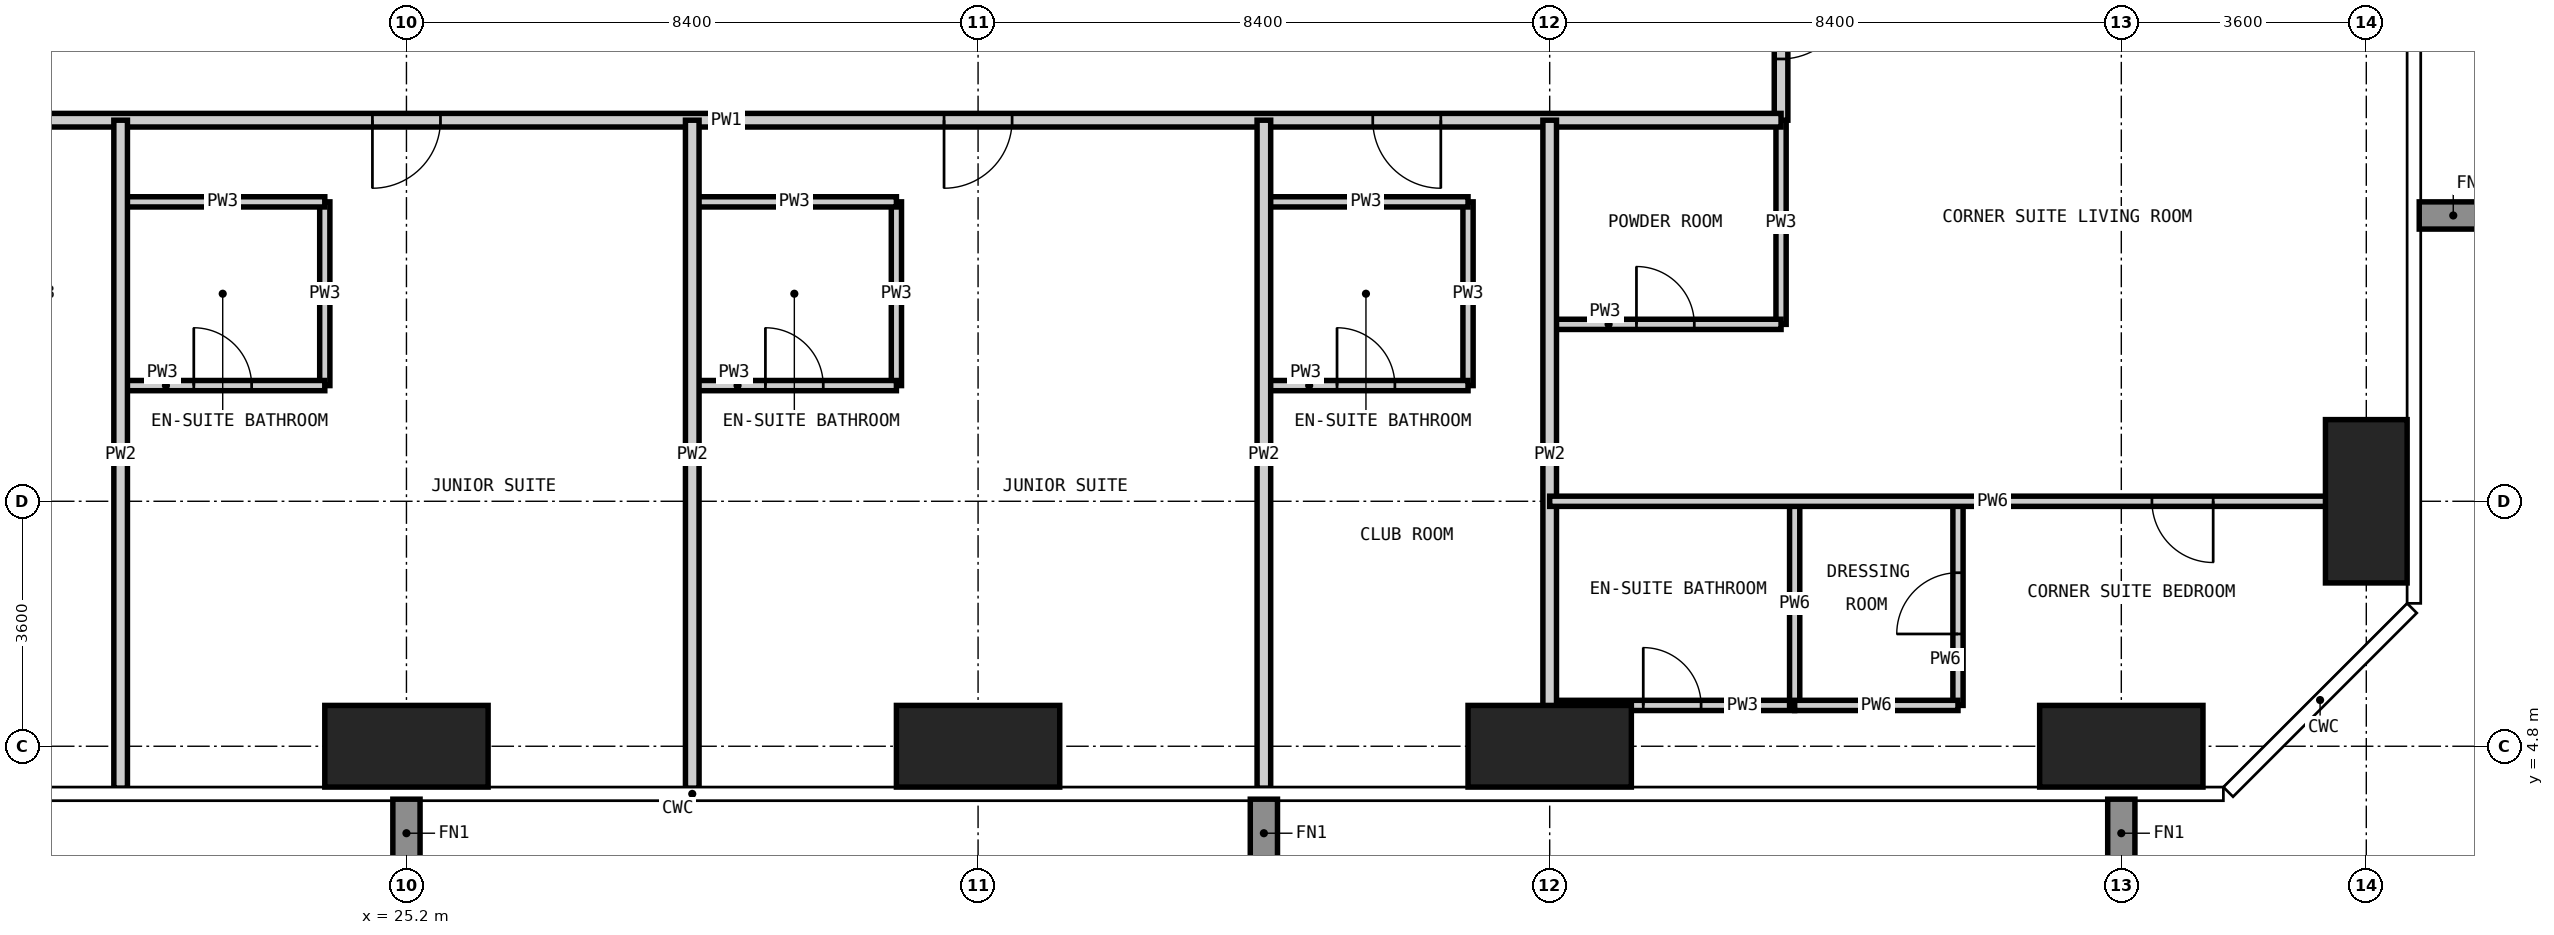
"""IFC4 building model, lengths in metres.
Left out: names, types, materials, properties, quantities, classifications, styles, units other than length and angle.
Written with IfcOpenShell. Run it as: python <this file> out.ifc"""

import sys

from ifc_helpers import new_model, si_unit, direction, frame, frame_2d, origin, origin_2d, place, context, subcontext, project, spatial, rectangle, extrude, element, fill, save


model = new_model("IFC4")
c1 = context("Model", 3, precision=1e-05, world=origin(), true_north=direction((0.0, 1.0)))
c2 = subcontext(c1, "Body", "Model", "MODEL_VIEW")
j1 = project(units=[si_unit("LENGTHUNIT", "METRE"), si_unit("PLANEANGLEUNIT", "RADIAN")], contexts=[c1])
p1 = place(None, origin())
s1 = spatial("IfcSite", under=j1, at=p1, CompositionType="ELEMENT")
p2 = place(p1, origin())
s2 = spatial("IfcBuilding", under=s1, at=p2, CompositionType="ELEMENT")
p3 = place(p2, frame((0.0, 0.0, 187.8)))
s3 = spatial("IfcBuildingStorey", under=s2, at=p3, CompositionType="ELEMENT", Elevation=187.8)
for number, where, z_axis, x_axis in (
    (1, (25.2, 4.8, -0.35), (0.0, 0.0, 1.0), (1.0, 0.0, 0.0)),
    (2, (33.6, 4.8, -0.35), (0.0, 0.0, 1.0), (1.0, 0.0, 0.0)),
    (3, (42.0, 4.8, -0.35), (0.0, 0.0, 1.0), (1.0, 0.0, 0.0)),
    (4, (50.4, 4.8, -0.35), (0.0, 0.0, 1.0), (1.0, 0.0, 0.0)),
):
    element("IfcColumn", number, at=place(p3, frame(where, z_axis=z_axis, x_axis=x_axis)), inside=s3, PredefinedType="COLUMN", context=c2, shape_type="SweptSolid", body=[
        extrude(rectangle(XDim=2.4, YDim=1.2, at=origin_2d()), origin(), (0.0, 0.0, 1.0), 3.6),
    ])
p4 = place(p3, frame((54.0, 8.4, -0.35), z_axis=(0.0, 0.0, 1.0), x_axis=(1.0, 0.0, 0.0)))
e5 = element("IfcColumn", 5, at=p4, inside=s3, PredefinedType="COLUMN", context=c2, shape_type="SweptSolid", body=[
    extrude(rectangle(XDim=1.2, YDim=2.4, at=origin_2d()), origin(), (0.0, 0.0, 1.0), 3.6),
])
for number, where, z_axis, x_axis in (
    (6, (24.0, 10.1, 0.0), (0.0, 0.0, 1.0), (0.0, 1.0, 0.0)),
    (7, (32.4, 10.1, 0.0), (0.0, 0.0, 1.0), (0.0, 1.0, 0.0)),
    (8, (40.8, 10.1, 0.0), (0.0, 0.0, 1.0), (0.0, 1.0, 0.0)),
):
    element("IfcWall", number, at=place(p3, frame(where, z_axis=z_axis, x_axis=x_axis)), inside=s3, PredefinedType="PARTITIONING", context=c2, shape_type="SweptSolid", body=[
        extrude(rectangle(XDim=2.7, YDim=0.15, at=frame_2d((1.35, 0.0))), origin(), (0.0, 0.0, 1.0), 3.25),
    ])
p5 = place(p3, frame((45.4, 11.0, 0.0), z_axis=(0.0, 0.0, 1.0), x_axis=(0.0, 1.0, 0.0)))
e9 = element("IfcWall", 9, at=p5, inside=s3, PredefinedType="PARTITIONING", context=c2, shape_type="SweptSolid", body=[
    extrude(rectangle(XDim=3.0, YDim=0.15, at=frame_2d((1.5, 0.0))), origin(), (0.0, 0.0, 1.0), 3.25),
])
p6 = place(p3, frame((42.0, 5.4, 0.0), z_axis=(0.0, 0.0, 1.0), x_axis=(1.0, 0.0, 0.0)))
e10 = element("IfcWall", 10, at=p6, inside=s3, PredefinedType="PARTITIONING", context=c2, shape_type="SweptSolid", body=[
    extrude(rectangle(XDim=3.6, YDim=0.15, at=frame_2d((1.8, 0.0))), origin(), (0.0, 0.0, 1.0), 3.25),
])
p7 = place(p6, frame((1.375, 0.0, 0.0)))
e11 = element("IfcOpeningElement", 11, at=p7, cuts=e10, PredefinedType="OPENING", context=c2, shape_type="SweptSolid", body=[
    extrude(rectangle(XDim=0.85, YDim=2.1, at=frame_2d((0.425, 1.05))), frame((0.0, 0.085, 0.0), z_axis=(0.0, -1.0, 0.0), x_axis=(1.0, 0.0, 0.0)), (0.0, 0.0, 1.0), 0.17),
])
p8 = place(p3, frame((21.0, 10.1, 0.0), z_axis=(0.0, 0.0, 1.0), x_axis=(1.0, 0.0, 0.0)))
e12 = element("IfcWall", 12, at=p8, inside=s3, PredefinedType="PARTITIONING", context=c2, shape_type="SweptSolid", body=[
    extrude(rectangle(XDim=3.0, YDim=0.15, at=frame_2d((1.5, 0.0))), origin(), (0.0, 0.0, 1.0), 3.25),
])
p9 = place(p8, frame((1.075, 0.0, 0.0)))
e13 = element("IfcOpeningElement", 13, at=p9, cuts=e12, PredefinedType="OPENING", context=c2, shape_type="SweptSolid", body=[
    extrude(rectangle(XDim=0.85, YDim=2.1, at=frame_2d((0.425, 1.05))), frame((0.0, 0.085, 0.0), z_axis=(0.0, -1.0, 0.0), x_axis=(1.0, 0.0, 0.0)), (0.0, 0.0, 1.0), 0.17),
])
p10 = place(p3, frame((29.4, 10.1, 0.0), z_axis=(0.0, 0.0, 1.0), x_axis=(1.0, 0.0, 0.0)))
e14 = element("IfcWall", 14, at=p10, inside=s3, PredefinedType="PARTITIONING", context=c2, shape_type="SweptSolid", body=[
    extrude(rectangle(XDim=3.0, YDim=0.15, at=frame_2d((1.5, 0.0))), origin(), (0.0, 0.0, 1.0), 3.25),
])
p11 = place(p10, frame((1.075, 0.0, 0.0)))
e15 = element("IfcOpeningElement", 15, at=p11, cuts=e14, PredefinedType="OPENING", context=c2, shape_type="SweptSolid", body=[
    extrude(rectangle(XDim=0.85, YDim=2.1, at=frame_2d((0.425, 1.05))), frame((0.0, 0.085, 0.0), z_axis=(0.0, -1.0, 0.0), x_axis=(1.0, 0.0, 0.0)), (0.0, 0.0, 1.0), 0.17),
])
p12 = place(p3, frame((37.8, 10.1, 0.0), z_axis=(0.0, 0.0, 1.0), x_axis=(1.0, 0.0, 0.0)))
e16 = element("IfcWall", 16, at=p12, inside=s3, PredefinedType="PARTITIONING", context=c2, shape_type="SweptSolid", body=[
    extrude(rectangle(XDim=3.0, YDim=0.15, at=frame_2d((1.5, 0.0))), origin(), (0.0, 0.0, 1.0), 3.25),
])
p13 = place(p12, frame((1.075, 0.0, 0.0)))
e17 = element("IfcOpeningElement", 17, at=p13, cuts=e16, PredefinedType="OPENING", context=c2, shape_type="SweptSolid", body=[
    extrude(rectangle(XDim=0.85, YDim=2.1, at=frame_2d((0.425, 1.05))), frame((0.0, 0.085, 0.0), z_axis=(0.0, -1.0, 0.0), x_axis=(1.0, 0.0, 0.0)), (0.0, 0.0, 1.0), 0.17),
])
p14 = place(p3, frame((42.0, 11.0, 0.0), z_axis=(0.0, 0.0, 1.0), x_axis=(1.0, 0.0, 0.0)))
e18 = element("IfcWall", 18, at=p14, inside=s3, PredefinedType="PARTITIONING", context=c2, shape_type="SweptSolid", body=[
    extrude(rectangle(XDim=3.4, YDim=0.15, at=frame_2d((1.7, 0.0))), origin(), (0.0, 0.0, 1.0), 3.25),
])
p15 = place(p14, frame((1.275, 0.0, 0.0)))
e19 = element("IfcOpeningElement", 19, at=p15, cuts=e18, PredefinedType="OPENING", context=c2, shape_type="SweptSolid", body=[
    extrude(rectangle(XDim=0.85, YDim=2.1, at=frame_2d((0.425, 1.05))), frame((0.0, 0.085, 0.0), z_axis=(0.0, -1.0, 0.0), x_axis=(1.0, 0.0, 0.0)), (0.0, 0.0, 1.0), 0.17),
])
for number, where, z_axis, x_axis in (
    (20, (21.0, 12.8, 0.0), (0.0, 0.0, 1.0), (1.0, 0.0, 0.0)),
    (21, (29.4, 12.8, 0.0), (0.0, 0.0, 1.0), (1.0, 0.0, 0.0)),
    (22, (37.8, 12.8, 0.0), (0.0, 0.0, 1.0), (1.0, 0.0, 0.0)),
):
    element("IfcWall", number, at=place(p3, frame(where, z_axis=z_axis, x_axis=x_axis)), inside=s3, PredefinedType="PARTITIONING", context=c2, shape_type="SweptSolid", body=[
        extrude(rectangle(XDim=3.0, YDim=0.15, at=frame_2d((1.5, 0.0))), origin(), (0.0, 0.0, 1.0), 3.25),
    ])
p16 = place(p3, frame((45.4, 44.2, 0.0), z_axis=(0.0, 0.0, 1.0), x_axis=(0.0, -1.0, 0.0)))
e23 = element("IfcWall", 23, at=p16, inside=s3, PredefinedType="PARTITIONING", context=c2, shape_type="SweptSolid", body=[
    extrude(rectangle(XDim=30.2, YDim=0.2, at=frame_2d((15.1, 0.0))), origin(), (0.0, 0.0, 1.0), 3.25),
])
p17 = place(p16, frame((21.8, 0.0, 0.0)))
e24 = element("IfcOpeningElement", 24, at=p17, cuts=e23, PredefinedType="OPENING", context=c2, shape_type="SweptSolid", body=[
    extrude(rectangle(XDim=1.0, YDim=2.2, at=frame_2d((0.5, 1.1))), frame((0.0, 0.11, 0.0), z_axis=(0.0, -1.0, 0.0), x_axis=(1.0, 0.0, 0.0)), (0.0, 0.0, 1.0), 0.22),
])
p18 = place(p16, frame((11.0, 0.0, 0.0)))
e25 = element("IfcOpeningElement", 25, at=p18, cuts=e23, PredefinedType="OPENING", context=c2, shape_type="SweptSolid", body=[
    extrude(rectangle(XDim=1.0, YDim=2.2, at=frame_2d((0.5, 1.1))), frame((0.0, 0.11, 0.0), z_axis=(0.0, -1.0, 0.0), x_axis=(1.0, 0.0, 0.0)), (0.0, 0.0, 1.0), 0.22),
])
p19 = place(p16, frame((3.8, 0.0, 0.0)))
e26 = element("IfcOpeningElement", 26, at=p19, cuts=e23, PredefinedType="OPENING", context=c2, shape_type="SweptSolid", body=[
    extrude(rectangle(XDim=1.0, YDim=2.2, at=frame_2d((0.5, 1.1))), frame((0.0, 0.11, 0.0), z_axis=(0.0, -1.0, 0.0), x_axis=(1.0, 0.0, 0.0)), (0.0, 0.0, 1.0), 0.22),
])
p20 = place(p16, frame((28.3, 0.0, 0.0)))
e27 = element("IfcOpeningElement", 27, at=p20, cuts=e23, PredefinedType="OPENING", context=c2, shape_type="SweptSolid", body=[
    extrude(rectangle(XDim=1.0, YDim=2.2, at=frame_2d((0.5, 1.1))), frame((0.0, 0.11, 0.0), z_axis=(0.0, -1.0, 0.0), x_axis=(1.0, 0.0, 0.0)), (0.0, 0.0, 1.0), 0.22),
])
p21 = place(p16, frame((0.6, 0.0, 0.0)))
e28 = element("IfcOpeningElement", 28, at=p21, cuts=e23, PredefinedType="OPENING", context=c2, shape_type="SweptSolid", body=[
    extrude(rectangle(XDim=1.0, YDim=2.2, at=frame_2d((0.5, 1.1))), frame((0.0, 0.11, 0.0), z_axis=(0.0, -1.0, 0.0), x_axis=(1.0, 0.0, 0.0)), (0.0, 0.0, 1.0), 0.22),
])
p22 = place(p3, frame((45.4, 14.0, 0.0), z_axis=(0.0, 0.0, 1.0), x_axis=(-1.0, 0.0, 0.0)))
e29 = element("IfcWall", 29, at=p22, inside=s3, PredefinedType="PARTITIONING", context=c2, shape_type="SweptSolid", body=[
    extrude(rectangle(XDim=31.4, YDim=0.2, at=frame_2d((15.7, 0.0))), origin(), (0.0, 0.0, 1.0), 3.25),
])
p23 = place(p22, frame((26.0, 0.0, 0.0)))
e30 = element("IfcOpeningElement", 30, at=p23, cuts=e29, PredefinedType="OPENING", context=c2, shape_type="SweptSolid", body=[
    extrude(rectangle(XDim=1.0, YDim=2.2, at=frame_2d((0.5, 1.1))), frame((0.0, 0.11, 0.0), z_axis=(0.0, -1.0, 0.0), x_axis=(1.0, 0.0, 0.0)), (0.0, 0.0, 1.0), 0.22),
])
p24 = place(p22, frame((19.7, 0.0, 0.0)))
e31 = element("IfcOpeningElement", 31, at=p24, cuts=e29, PredefinedType="OPENING", context=c2, shape_type="SweptSolid", body=[
    extrude(rectangle(XDim=1.0, YDim=2.2, at=frame_2d((0.5, 1.1))), frame((0.0, 0.11, 0.0), z_axis=(0.0, -1.0, 0.0), x_axis=(1.0, 0.0, 0.0)), (0.0, 0.0, 1.0), 0.22),
])
p25 = place(p22, frame((11.3, 0.0, 0.0)))
e32 = element("IfcOpeningElement", 32, at=p25, cuts=e29, PredefinedType="OPENING", context=c2, shape_type="SweptSolid", body=[
    extrude(rectangle(XDim=1.0, YDim=2.2, at=frame_2d((0.5, 1.1))), frame((0.0, 0.11, 0.0), z_axis=(0.0, -1.0, 0.0), x_axis=(1.0, 0.0, 0.0)), (0.0, 0.0, 1.0), 0.22),
])
p26 = place(p22, frame((5.0, 0.0, 0.0)))
e33 = element("IfcOpeningElement", 33, at=p26, cuts=e29, PredefinedType="OPENING", context=c2, shape_type="SweptSolid", body=[
    extrude(rectangle(XDim=1.0, YDim=2.2, at=frame_2d((0.5, 1.1))), frame((0.0, 0.11, 0.0), z_axis=(0.0, -1.0, 0.0), x_axis=(1.0, 0.0, 0.0)), (0.0, 0.0, 1.0), 0.22),
])
for number, where, z_axis, x_axis in (
    (34, (21.0, 4.182, 0.0), (0.0, 0.0, 1.0), (0.0, 1.0, 0.0)),
    (35, (29.4, 4.182, 0.0), (0.0, 0.0, 1.0), (0.0, 1.0, 0.0)),
    (36, (37.8, 4.182, 0.0), (0.0, 0.0, 1.0), (0.0, 1.0, 0.0)),
    (37, (42.0, 4.182, 0.0), (0.0, 0.0, 1.0), (0.0, 1.0, 0.0)),
):
    element("IfcWall", number, at=place(p3, frame(where, z_axis=z_axis, x_axis=x_axis)), inside=s3, PredefinedType="PARTITIONING", context=c2, shape_type="SweptSolid", body=[
        extrude(rectangle(XDim=9.818, YDim=0.2, at=frame_2d((4.909, 0.0))), origin(), (0.0, 0.0, 1.0), 3.25),
    ])
p27 = place(p3, frame((45.6, 5.4, 0.0), z_axis=(0.0, 0.0, 1.0), x_axis=(0.0, 1.0, 0.0)))
e38 = element("IfcWall", 38, at=p27, inside=s3, PredefinedType="PARTITIONING", context=c2, shape_type="SweptSolid", body=[
    extrude(rectangle(XDim=3.0, YDim=0.15, at=frame_2d((1.5, 0.0))), origin(), (0.0, 0.0, 1.0), 3.25),
])
p28 = place(p3, frame((48.0, 5.4, 0.0), z_axis=(0.0, 0.0, 1.0), x_axis=(0.0, 1.0, 0.0)))
e39 = element("IfcWall", 39, at=p28, inside=s3, PredefinedType="PARTITIONING", context=c2, shape_type="SweptSolid", body=[
    extrude(rectangle(XDim=3.0, YDim=0.15, at=frame_2d((1.5, 0.0))), origin(), (0.0, 0.0, 1.0), 3.25),
])
p29 = place(p28, frame((1.05, 0.0, 0.0)))
e40 = element("IfcOpeningElement", 40, at=p29, cuts=e39, PredefinedType="OPENING", context=c2, shape_type="SweptSolid", body=[
    extrude(rectangle(XDim=0.9, YDim=2.1, at=frame_2d((0.45, 1.05))), frame((0.0, 0.085, 0.0), z_axis=(0.0, -1.0, 0.0), x_axis=(1.0, 0.0, 0.0)), (0.0, 0.0, 1.0), 0.17),
])
p30 = place(p3, frame((45.6, 5.4, 0.0), z_axis=(0.0, 0.0, 1.0), x_axis=(1.0, 0.0, 0.0)))
e41 = element("IfcWall", 41, at=p30, inside=s3, PredefinedType="PARTITIONING", context=c2, shape_type="SweptSolid", body=[
    extrude(rectangle(XDim=2.4, YDim=0.15, at=frame_2d((1.2, 0.0))), origin(), (0.0, 0.0, 1.0), 3.25),
])
p31 = place(p3, frame((42.0, 8.4, 0.0), z_axis=(0.0, 0.0, 1.0), x_axis=(1.0, 0.0, 0.0)))
e42 = element("IfcWall", 42, at=p31, inside=s3, PredefinedType="PARTITIONING", context=c2, shape_type="SweptSolid", body=[
    extrude(rectangle(XDim=12.618, YDim=0.15, at=frame_2d((6.309, 0.0))), origin(), (0.0, 0.0, 1.0), 3.25),
])
p32 = place(p31, frame((8.85, 0.0, 0.0)))
e43 = element("IfcOpeningElement", 43, at=p32, cuts=e42, PredefinedType="OPENING", context=c2, shape_type="SweptSolid", body=[
    extrude(rectangle(XDim=0.9, YDim=2.1, at=frame_2d((0.45, 1.05))), frame((0.0, 0.085, 0.0), z_axis=(0.0, -1.0, 0.0), x_axis=(1.0, 0.0, 0.0)), (0.0, 0.0, 1.0), 0.17),
])
p33 = place(p24, origin())
e44 = element("IfcDoor", 44, at=p33, inside=s3, OperationType="SINGLE_SWING_RIGHT", PredefinedType="DOOR", context=c2, shape_type="SweptSolid", body=[
    extrude(rectangle(XDim=1.0, YDim=2.2, at=frame_2d((0.5, 1.1))), frame((0.0, 0.025, 0.0), z_axis=(0.0, -1.0, 0.0), x_axis=(1.0, 0.0, 0.0)), (0.0, 0.0, 1.0), 0.05),
])
fill(e31, e44)
p34 = place(p9, origin())
e45 = element("IfcDoor", 45, at=p34, inside=s3, OperationType="SINGLE_SWING_LEFT", PredefinedType="DOOR", context=c2, shape_type="SweptSolid", body=[
    extrude(rectangle(XDim=0.85, YDim=2.1, at=frame_2d((0.425, 1.05))), frame((0.0, 0.025, 0.0), z_axis=(0.0, -1.0, 0.0), x_axis=(1.0, 0.0, 0.0)), (0.0, 0.0, 1.0), 0.05),
])
fill(e13, e45)
p35 = place(p25, origin())
e46 = element("IfcDoor", 46, at=p35, inside=s3, OperationType="SINGLE_SWING_RIGHT", PredefinedType="DOOR", context=c2, shape_type="SweptSolid", body=[
    extrude(rectangle(XDim=1.0, YDim=2.2, at=frame_2d((0.5, 1.1))), frame((0.0, 0.025, 0.0), z_axis=(0.0, -1.0, 0.0), x_axis=(1.0, 0.0, 0.0)), (0.0, 0.0, 1.0), 0.05),
])
fill(e32, e46)
p36 = place(p11, origin())
e47 = element("IfcDoor", 47, at=p36, inside=s3, OperationType="SINGLE_SWING_LEFT", PredefinedType="DOOR", context=c2, shape_type="SweptSolid", body=[
    extrude(rectangle(XDim=0.85, YDim=2.1, at=frame_2d((0.425, 1.05))), frame((0.0, 0.025, 0.0), z_axis=(0.0, -1.0, 0.0), x_axis=(1.0, 0.0, 0.0)), (0.0, 0.0, 1.0), 0.05),
])
fill(e15, e47)
p37 = place(p26, origin())
e48 = element("IfcDoor", 48, at=p37, inside=s3, OperationType="SINGLE_SWING_LEFT", PredefinedType="DOOR", context=c2, shape_type="SweptSolid", body=[
    extrude(rectangle(XDim=1.0, YDim=2.2, at=frame_2d((0.5, 1.1))), frame((0.0, 0.025, 0.0), z_axis=(0.0, -1.0, 0.0), x_axis=(1.0, 0.0, 0.0)), (0.0, 0.0, 1.0), 0.05),
])
fill(e33, e48)
p38 = place(p13, origin())
e49 = element("IfcDoor", 49, at=p38, inside=s3, OperationType="SINGLE_SWING_LEFT", PredefinedType="DOOR", context=c2, shape_type="SweptSolid", body=[
    extrude(rectangle(XDim=0.85, YDim=2.1, at=frame_2d((0.425, 1.05))), frame((0.0, 0.025, 0.0), z_axis=(0.0, -1.0, 0.0), x_axis=(1.0, 0.0, 0.0)), (0.0, 0.0, 1.0), 0.05),
])
fill(e17, e49)
p39 = place(p20, origin())
e50 = element("IfcDoor", 50, at=p39, inside=s3, OperationType="SINGLE_SWING_LEFT", PredefinedType="DOOR", context=c2, shape_type="SweptSolid", body=[
    extrude(rectangle(XDim=1.0, YDim=2.2, at=frame_2d((0.5, 1.1))), frame((0.0, 0.025, 0.0), z_axis=(0.0, -1.0, 0.0), x_axis=(1.0, 0.0, 0.0)), (0.0, 0.0, 1.0), 0.05),
])
fill(e27, e50)
p40 = place(p15, origin())
e51 = element("IfcDoor", 51, at=p40, inside=s3, OperationType="SINGLE_SWING_LEFT", PredefinedType="DOOR", context=c2, shape_type="SweptSolid", body=[
    extrude(rectangle(XDim=0.85, YDim=2.1, at=frame_2d((0.425, 1.05))), frame((0.0, 0.025, 0.0), z_axis=(0.0, -1.0, 0.0), x_axis=(1.0, 0.0, 0.0)), (0.0, 0.0, 1.0), 0.05),
])
fill(e19, e51)
p41 = place(p32, frame((0.9, 0.0, 0.0), z_axis=(0.0, 0.0, 1.0), x_axis=(-1.0, 0.0, 0.0)))
e52 = element("IfcDoor", 52, at=p41, inside=s3, OperationType="SINGLE_SWING_LEFT", PredefinedType="DOOR", context=c2, shape_type="SweptSolid", body=[
    extrude(rectangle(XDim=0.9, YDim=2.1, at=frame_2d((0.45, 1.05))), frame((0.0, 0.025, 0.0), z_axis=(0.0, -1.0, 0.0), x_axis=(1.0, 0.0, 0.0)), (0.0, 0.0, 1.0), 0.05),
])
fill(e43, e52)
p42 = place(p7, origin())
e53 = element("IfcDoor", 53, at=p42, inside=s3, OperationType="SINGLE_SWING_LEFT", PredefinedType="DOOR", context=c2, shape_type="SweptSolid", body=[
    extrude(rectangle(XDim=0.85, YDim=2.1, at=frame_2d((0.425, 1.05))), frame((0.0, 0.025, 0.0), z_axis=(0.0, -1.0, 0.0), x_axis=(1.0, 0.0, 0.0)), (0.0, 0.0, 1.0), 0.05),
])
fill(e11, e53)
p43 = place(p29, origin())
e54 = element("IfcDoor", 54, at=p43, inside=s3, OperationType="SINGLE_SWING_LEFT", PredefinedType="DOOR", context=c2, shape_type="SweptSolid", body=[
    extrude(rectangle(XDim=0.9, YDim=2.1, at=frame_2d((0.45, 1.05))), frame((0.0, 0.025, 0.0), z_axis=(0.0, -1.0, 0.0), x_axis=(1.0, 0.0, 0.0)), (0.0, 0.0, 1.0), 0.05),
])
fill(e40, e54)
save(model, sys.argv[1])
